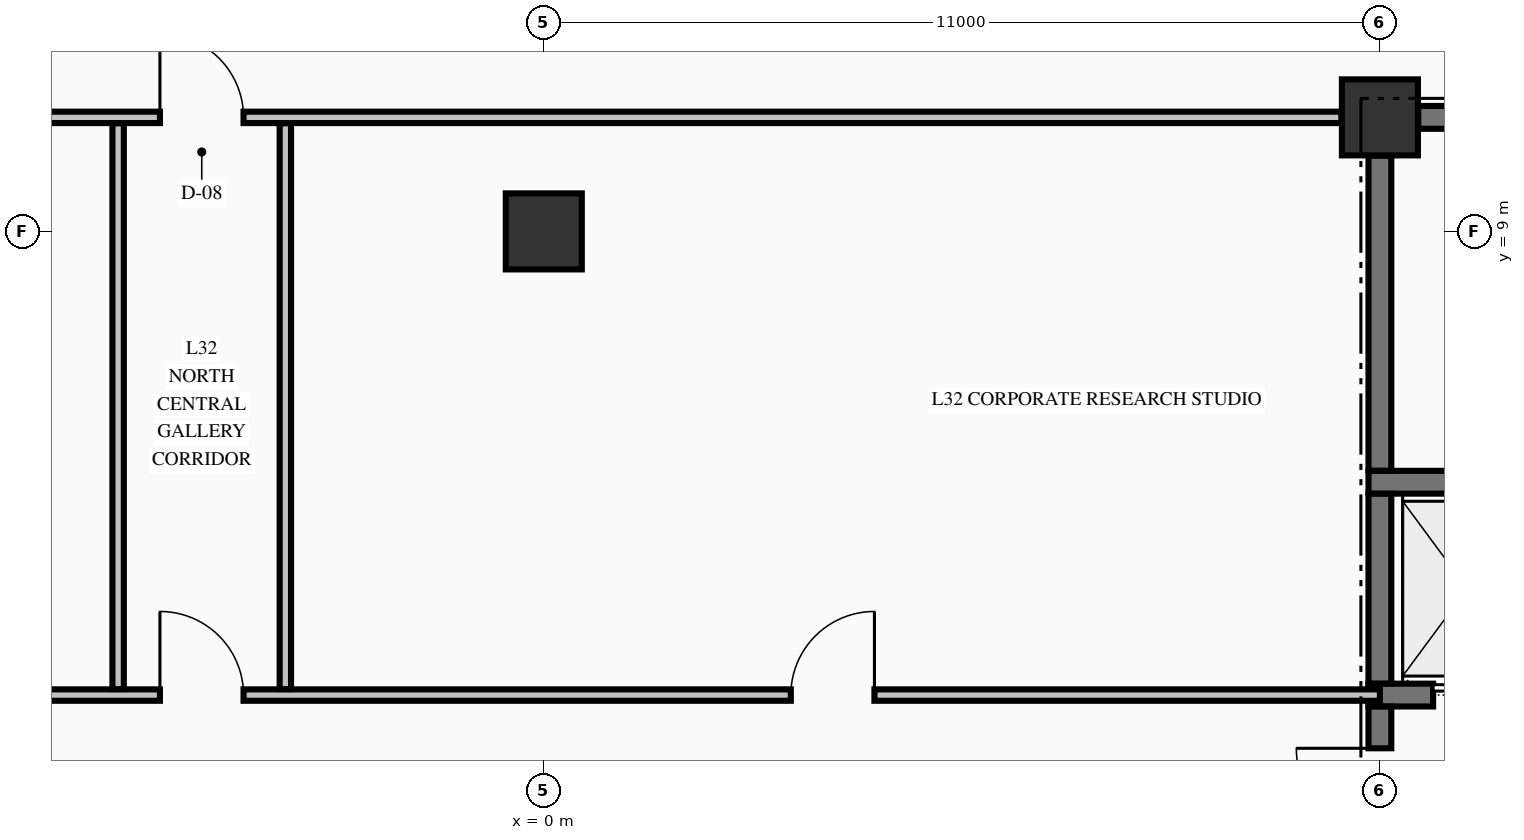
"""IFC4 building model, lengths in metres.
Left out: names, types, materials, properties, quantities, classifications, styles, units other than length and angle.
Written with IfcOpenShell. Run it as: python <this file> out.ifc"""

import sys

from ifc_helpers import new_model, si_unit, direction, frame, frame_2d, origin, origin_2d, place, context, subcontext, project, spatial, rectangle, extrude, element, fill, save


model = new_model("IFC4")
c1 = context("Model", 3, precision=1e-05, world=origin(), true_north=direction((0.0, 1.0)))
c2 = subcontext(c1, "Body", "Model", "MODEL_VIEW")
j1 = project(units=[si_unit("LENGTHUNIT", "METRE"), si_unit("PLANEANGLEUNIT", "RADIAN")], contexts=[c1])
p1 = place(None, origin())
s1 = spatial("IfcSite", under=j1, at=p1, CompositionType="ELEMENT")
p2 = place(p1, origin())
s2 = spatial("IfcBuilding", under=s1, at=p2, CompositionType="ELEMENT")
p3 = place(p2, frame((0.0, 0.0, 128.49)))
s3 = spatial("IfcBuildingStorey", under=s2, at=p3, CompositionType="ELEMENT", Elevation=128.49)
for number, where, z_axis, x_axis in (
    (1, (11.0, 10.5, -0.25), (0.0, 0.0, 1.0), (1.0, 0.0, 0.0)),
    (2, (0.0, 9.0, -0.25), (0.0, 0.0, 1.0), (1.0, 0.0, 0.0)),
):
    element("IfcColumn", number, at=place(p3, frame(where, z_axis=z_axis, x_axis=x_axis)), inside=s3, PredefinedType="COLUMN", context=c2, shape_type="SweptSolid", body=[
        extrude(rectangle(XDim=1.0, YDim=1.0, at=origin_2d()), origin(), (0.0, 0.0, 1.0), 3.57),
    ])
p4 = place(p3, frame((10.85, 2.9, 0.0), z_axis=(0.0, 0.0, 1.0), x_axis=(1.0, 0.0, 0.0)))
e3 = element("IfcWall", 3, at=p4, inside=s3, PredefinedType="SHEAR", context=c2, shape_type="SweptSolid", body=[
    extrude(rectangle(XDim=4.025, YDim=0.3, at=frame_2d((2.012, 0.0))), origin(), (0.0, 0.0, 1.0), 3.32),
])
p5 = place(p4, frame((0.85, 0.0, 0.0)))
e4 = element("IfcOpeningElement", 4, at=p5, cuts=e3, PredefinedType="OPENING", context=c2, shape_type="SweptSolid", body=[
    extrude(rectangle(XDim=1.1, YDim=2.2, at=frame_2d((0.55, 1.1))), frame((0.0, 0.16, 0.0), z_axis=(0.0, -1.0, 0.0), x_axis=(1.0, 0.0, 0.0)), (0.0, 0.0, 1.0), 0.32),
])
p6 = place(p3, frame((10.85, 5.7, 0.0), z_axis=(0.0, 0.0, 1.0), x_axis=(1.0, 0.0, 0.0)))
e5 = element("IfcWall", 5, at=p6, inside=s3, PredefinedType="SHEAR", context=c2, shape_type="SweptSolid", body=[
    extrude(rectangle(XDim=4.025, YDim=0.3, at=frame_2d((2.012, 0.0))), origin(), (0.0, 0.0, 1.0), 3.32),
])
p7 = place(p3, frame((11.504, 10.5, 0.0), z_axis=(0.0, 0.0, 1.0), x_axis=(1.0, 0.0, 0.0)))
e6 = element("IfcWall", 6, at=p7, inside=s3, PredefinedType="SHEAR", context=c2, shape_type="SweptSolid", body=[
    extrude(rectangle(XDim=3.196, YDim=0.3, at=frame_2d((1.598, 0.0))), origin(), (0.0, 0.0, 1.0), 3.32),
])
p8 = place(p7, frame((2.001, 0.0, 0.0)))
e7 = element("IfcOpeningElement", 7, at=p8, cuts=e6, PredefinedType="OPENING", context=c2, shape_type="SweptSolid", body=[
    extrude(rectangle(XDim=0.95, YDim=2.15, at=frame_2d((0.475, 1.075))), frame((0.0, 0.16, 0.0), z_axis=(0.0, -1.0, 0.0), x_axis=(1.0, 0.0, 0.0)), (0.0, 0.0, 1.0), 0.32),
])
p9 = place(p3, frame((-11.0, 2.9, 0.0), z_axis=(0.0, 0.0, 1.0), x_axis=(1.0, 0.0, 0.0)))
e8 = element("IfcWall", 8, at=p9, inside=s3, PredefinedType="PARTITIONING", context=c2, shape_type="SweptSolid", body=[
    extrude(rectangle(XDim=22.0, YDim=0.15, at=frame_2d((11.0, 0.0))), origin(), (0.0, 0.0, 1.0), 3.32),
])
p10 = place(p9, frame((5.95, 0.0, 0.0)))
e9 = element("IfcOpeningElement", 9, at=p10, cuts=e8, PredefinedType="OPENING", context=c2, shape_type="SweptSolid", body=[
    extrude(rectangle(XDim=1.1, YDim=2.15, at=frame_2d((0.55, 1.075))), frame((0.0, 0.085, 0.0), z_axis=(0.0, -1.0, 0.0), x_axis=(1.0, 0.0, 0.0)), (0.0, 0.0, 1.0), 0.17),
])
p11 = place(p9, frame((2.175, 0.0, 0.0)))
e10 = element("IfcOpeningElement", 10, at=p11, cuts=e8, PredefinedType="OPENING", context=c2, shape_type="SweptSolid", body=[
    extrude(rectangle(XDim=1.05, YDim=2.15, at=frame_2d((0.525, 1.075))), frame((0.0, 0.085, 0.0), z_axis=(0.0, -1.0, 0.0), x_axis=(1.0, 0.0, 0.0)), (0.0, 0.0, 1.0), 0.17),
])
p12 = place(p9, frame((14.25, 0.0, 0.0)))
e11 = element("IfcOpeningElement", 11, at=p12, cuts=e8, PredefinedType="OPENING", context=c2, shape_type="SweptSolid", body=[
    extrude(rectangle(XDim=1.1, YDim=2.15, at=frame_2d((0.55, 1.075))), frame((0.0, 0.085, 0.0), z_axis=(0.0, -1.0, 0.0), x_axis=(1.0, 0.0, 0.0)), (0.0, 0.0, 1.0), 0.17),
])
p13 = place(p3, frame((-10.494, 10.5, 0.0), z_axis=(0.0, 0.0, 1.0), x_axis=(1.0, 0.0, 0.0)))
e12 = element("IfcWall", 12, at=p13, inside=s3, PredefinedType="PARTITIONING", context=c2, shape_type="SweptSolid", body=[
    extrude(rectangle(XDim=20.988, YDim=0.15, at=frame_2d((10.494, 0.0))), origin(), (0.0, 0.0, 1.0), 3.32),
])
p14 = place(p13, frame((5.444, 0.0, 0.0)))
e13 = element("IfcOpeningElement", 13, at=p14, cuts=e12, PredefinedType="OPENING", context=c2, shape_type="SweptSolid", body=[
    extrude(rectangle(XDim=1.1, YDim=2.15, at=frame_2d((0.55, 1.075))), frame((0.0, 0.085, 0.0), z_axis=(0.0, -1.0, 0.0), x_axis=(1.0, 0.0, 0.0)), (0.0, 0.0, 1.0), 0.17),
])
p15 = place(p3, frame((11.0, 0.504, 0.0), z_axis=(0.0, 0.0, 1.0), x_axis=(0.0, 1.0, 0.0)))
e14 = element("IfcWall", 14, at=p15, inside=s3, PredefinedType="SHEAR", context=c2, shape_type="SweptSolid", body=[
    extrude(rectangle(XDim=2.244, YDim=0.3, at=frame_2d((1.122, 0.0))), origin(), (0.0, 0.0, 1.0), 3.32),
])
p16 = place(p15, frame((0.596, 0.0, 0.0)))
e15 = element("IfcOpeningElement", 15, at=p16, cuts=e14, PredefinedType="OPENING", context=c2, shape_type="SweptSolid", body=[
    extrude(rectangle(XDim=1.1, YDim=2.15, at=frame_2d((0.55, 1.075))), frame((0.0, 0.16, 0.0), z_axis=(0.0, -1.0, 0.0), x_axis=(1.0, 0.0, 0.0)), (0.0, 0.0, 1.0), 0.32),
])
p17 = place(p3, frame((11.0, 3.052, 0.0), z_axis=(0.0, 0.0, 1.0), x_axis=(0.0, 1.0, 0.0)))
e16 = element("IfcWall", 16, at=p17, inside=s3, PredefinedType="SHEAR", context=c2, shape_type="SweptSolid", body=[
    extrude(rectangle(XDim=2.496, YDim=0.3, at=frame_2d((1.248, 0.0))), origin(), (0.0, 0.0, 1.0), 3.32),
])
p18 = place(p3, frame((11.0, 5.852, 0.0), z_axis=(0.0, 0.0, 1.0), x_axis=(0.0, 1.0, 0.0)))
e17 = element("IfcWall", 17, at=p18, inside=s3, PredefinedType="SHEAR", context=c2, shape_type="SweptSolid", body=[
    extrude(rectangle(XDim=4.144, YDim=0.3, at=frame_2d((2.072, 0.0))), origin(), (0.0, 0.0, 1.0), 3.32),
])
for number, where, z_axis, x_axis in (
    (18, (-5.6, 2.978, 0.0), (0.0, 0.0, 1.0), (0.0, 1.0, 0.0)),
    (19, (-3.4, 2.978, 0.0), (0.0, 0.0, 1.0), (0.0, 1.0, 0.0)),
):
    element("IfcWall", number, at=place(p3, frame(where, z_axis=z_axis, x_axis=x_axis)), inside=s3, PredefinedType="PARTITIONING", context=c2, shape_type="SweptSolid", body=[
        extrude(rectangle(XDim=7.444, YDim=0.15, at=frame_2d((3.722, 0.0))), origin(), (0.0, 0.0, 1.0), 3.32),
    ])
p19 = place(p16, origin())
e20 = element("IfcDoor", 20, at=p19, inside=s3, OperationType="SINGLE_SWING_RIGHT", PredefinedType="DOOR", context=c2, shape_type="SweptSolid", body=[
    extrude(rectangle(XDim=1.1, YDim=2.15, at=frame_2d((0.55, 1.075))), frame((0.0, 0.025, 0.0), z_axis=(0.0, -1.0, 0.0), x_axis=(1.0, 0.0, 0.0)), (0.0, 0.0, 1.0), 0.05),
])
fill(e15, e20)
p20 = place(p5, origin())
e21 = element("IfcDoor", 21, at=p20, inside=s3, OperationType="SLIDING_TO_RIGHT", PredefinedType="DOOR", context=c2, shape_type="SweptSolid", body=[
    extrude(rectangle(XDim=1.1, YDim=2.2, at=frame_2d((0.55, 1.1))), frame((0.0, 0.025, 0.0), z_axis=(0.0, -1.0, 0.0), x_axis=(1.0, 0.0, 0.0)), (0.0, 0.0, 1.0), 0.05),
])
fill(e4, e21)
p21 = place(p14, origin())
e22 = element("IfcDoor", 22, at=p21, inside=s3, OperationType="SINGLE_SWING_LEFT", PredefinedType="DOOR", context=c2, shape_type="SweptSolid", body=[
    extrude(rectangle(XDim=1.1, YDim=2.15, at=frame_2d((0.55, 1.075))), frame((0.0, 0.025, 0.0), z_axis=(0.0, -1.0, 0.0), x_axis=(1.0, 0.0, 0.0)), (0.0, 0.0, 1.0), 0.05),
])
fill(e13, e22)
p22 = place(p10, origin())
e23 = element("IfcDoor", 23, at=p22, inside=s3, OperationType="SINGLE_SWING_LEFT", PredefinedType="DOOR", context=c2, shape_type="SweptSolid", body=[
    extrude(rectangle(XDim=1.1, YDim=2.15, at=frame_2d((0.55, 1.075))), frame((0.0, 0.025, 0.0), z_axis=(0.0, -1.0, 0.0), x_axis=(1.0, 0.0, 0.0)), (0.0, 0.0, 1.0), 0.05),
])
fill(e9, e23)
p23 = place(p12, origin())
e24 = element("IfcDoor", 24, at=p23, inside=s3, OperationType="SINGLE_SWING_RIGHT", PredefinedType="DOOR", context=c2, shape_type="SweptSolid", body=[
    extrude(rectangle(XDim=1.1, YDim=2.15, at=frame_2d((0.55, 1.075))), frame((0.0, 0.025, 0.0), z_axis=(0.0, -1.0, 0.0), x_axis=(1.0, 0.0, 0.0)), (0.0, 0.0, 1.0), 0.05),
])
fill(e11, e24)
save(model, sys.argv[1])
